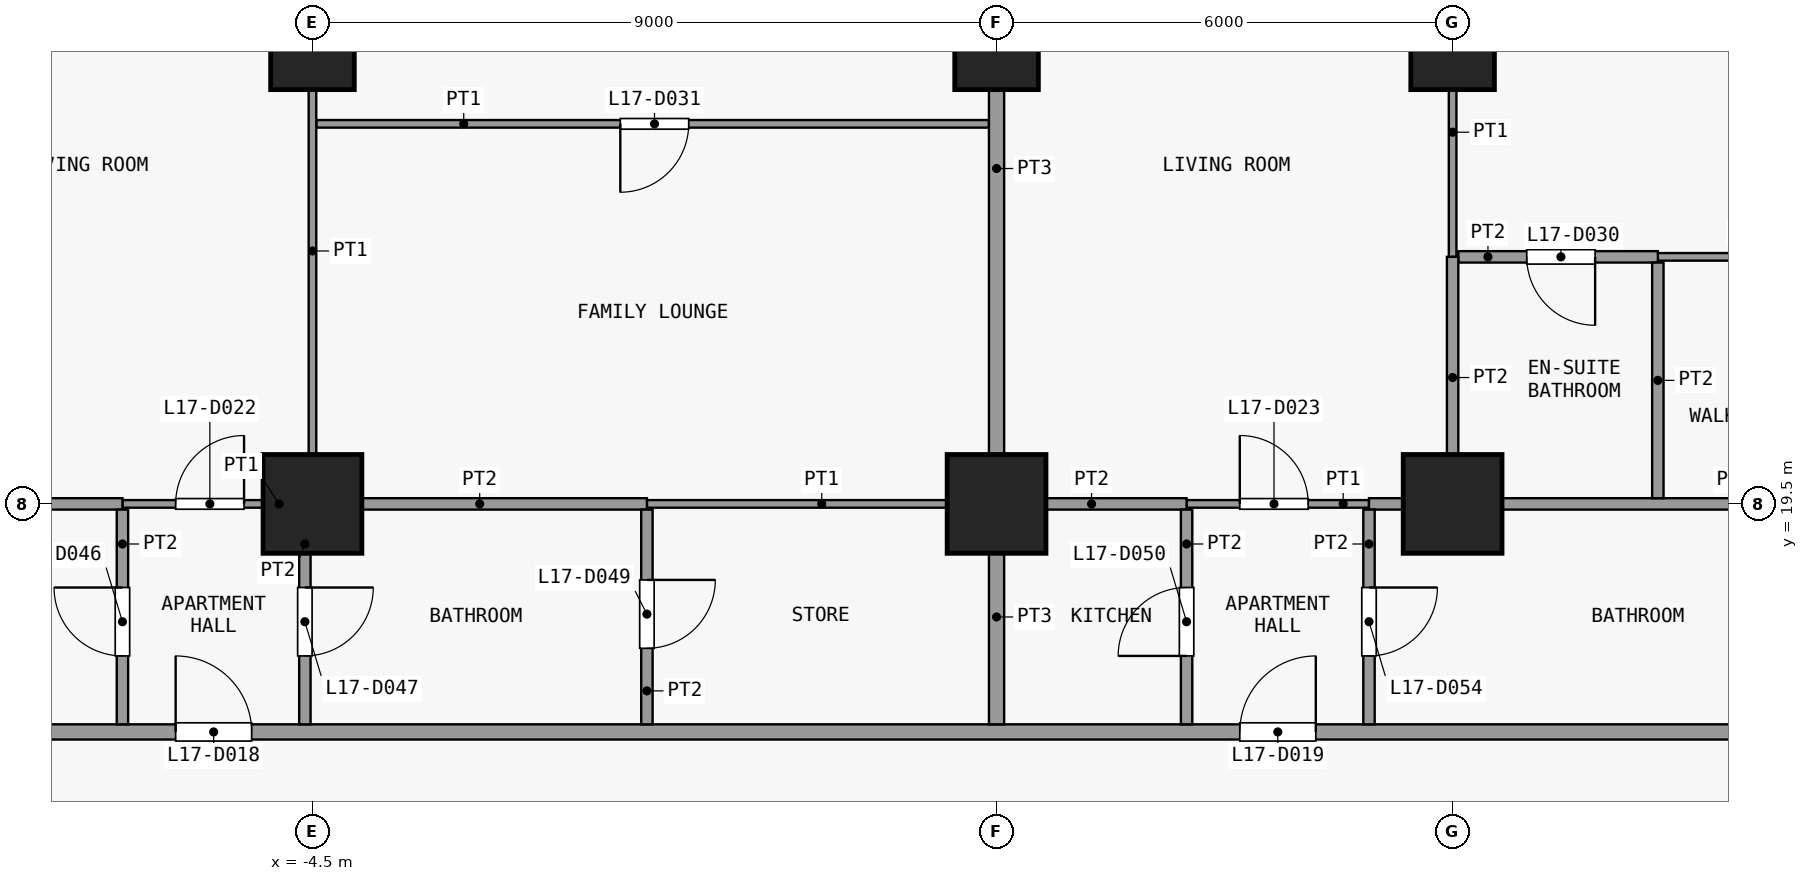
"""IFC4 building model, lengths in metres.
Left out: names, types, materials, properties, quantities, classifications, styles, units other than length and angle.
Written with IfcOpenShell. Run it as: python <this file> out.ifc"""

import sys

from ifc_helpers import new_model, si_unit, direction, frame, frame_2d, origin, origin_2d, place, context, subcontext, project, spatial, rectangle, extrude, element, fill, save


model = new_model("IFC4")
c1 = context("Model", 3, precision=1e-05, world=origin(), true_north=direction((0.0, 1.0)))
c2 = subcontext(c1, "Body", "Model", "MODEL_VIEW")
j1 = project(units=[si_unit("LENGTHUNIT", "METRE"), si_unit("PLANEANGLEUNIT", "RADIAN")], contexts=[c1])
p1 = place(None, origin())
s1 = spatial("IfcSite", under=j1, at=p1, CompositionType="ELEMENT")
p2 = place(p1, origin())
s2 = spatial("IfcBuilding", under=s1, at=p2, CompositionType="ELEMENT")
p3 = place(p2, frame((0.0, 0.0, 72.1)))
s3 = spatial("IfcBuildingStorey", under=s2, at=p3, CompositionType="ELEMENT", Elevation=72.1)
p4 = place(p3, frame((-4.5, 19.5, 0.0), z_axis=(0.0, 0.0, 1.0), x_axis=(1.0, 0.0, 0.0)))
e1 = element("IfcColumn", 1, at=p4, inside=s3, PredefinedType="COLUMN", context=c2, shape_type="SweptSolid", body=[
    extrude(rectangle(XDim=1.3, YDim=1.3, at=origin_2d()), origin(), (0.0, 0.0, 1.0), 3.6),
])
p5 = place(p3, frame((-4.5, 25.5, 0.0), z_axis=(0.0, 0.0, 1.0), x_axis=(1.0, 0.0, 0.0)))
e2 = element("IfcColumn", 2, at=p5, inside=s3, PredefinedType="COLUMN", context=c2, shape_type="SweptSolid", body=[
    extrude(rectangle(XDim=1.1, YDim=1.1, at=origin_2d()), origin(), (0.0, 0.0, 1.0), 3.6),
])
p6 = place(p3, frame((4.5, 19.5, 0.0), z_axis=(0.0, 0.0, 1.0), x_axis=(1.0, 0.0, 0.0)))
e3 = element("IfcColumn", 3, at=p6, inside=s3, PredefinedType="COLUMN", context=c2, shape_type="SweptSolid", body=[
    extrude(rectangle(XDim=1.3, YDim=1.3, at=origin_2d()), origin(), (0.0, 0.0, 1.0), 3.6),
])
p7 = place(p3, frame((4.5, 25.5, 0.0), z_axis=(0.0, 0.0, 1.0), x_axis=(1.0, 0.0, 0.0)))
e4 = element("IfcColumn", 4, at=p7, inside=s3, PredefinedType="COLUMN", context=c2, shape_type="SweptSolid", body=[
    extrude(rectangle(XDim=1.1, YDim=1.1, at=origin_2d()), origin(), (0.0, 0.0, 1.0), 3.6),
])
p8 = place(p3, frame((10.5, 19.5, 0.0), z_axis=(0.0, 0.0, 1.0), x_axis=(1.0, 0.0, 0.0)))
e5 = element("IfcColumn", 5, at=p8, inside=s3, PredefinedType="COLUMN", context=c2, shape_type="SweptSolid", body=[
    extrude(rectangle(XDim=1.3, YDim=1.3, at=origin_2d()), origin(), (0.0, 0.0, 1.0), 3.6),
])
p9 = place(p3, frame((10.5, 25.5, 0.0), z_axis=(0.0, 0.0, 1.0), x_axis=(1.0, 0.0, 0.0)))
e6 = element("IfcColumn", 6, at=p9, inside=s3, PredefinedType="COLUMN", context=c2, shape_type="SweptSolid", body=[
    extrude(rectangle(XDim=1.1, YDim=1.1, at=origin_2d()), origin(), (0.0, 0.0, 1.0), 3.6),
])
p10 = place(p3, frame((-25.35, 16.5, 0.0), z_axis=(0.0, 0.0, 1.0), x_axis=(1.0, 0.0, 0.0)))
e7 = element("IfcWall", 7, at=p10, inside=s3, PredefinedType="PARTITIONING", context=c2, shape_type="SweptSolid", body=[
    extrude(rectangle(XDim=50.7, YDim=0.2, at=frame_2d((25.35, 0.0))), origin(), (0.0, 0.0, 1.0), 3.15),
])
p11 = place(p10, frame((4.55, 0.0, 0.0)))
e8 = element("IfcOpeningElement", 8, at=p11, cuts=e7, PredefinedType="OPENING", context=c2, shape_type="SweptSolid", body=[
    extrude(rectangle(XDim=1.0, YDim=2.1, at=frame_2d((0.5, 1.05))), frame((0.0, 0.11, 0.0), z_axis=(0.0, -1.0, 0.0), x_axis=(1.0, 0.0, 0.0)), (0.0, 0.0, 1.0), 0.22),
])
p12 = place(p10, frame((19.05, 0.0, 0.0)))
e9 = element("IfcOpeningElement", 9, at=p12, cuts=e7, PredefinedType="OPENING", context=c2, shape_type="SweptSolid", body=[
    extrude(rectangle(XDim=1.0, YDim=2.1, at=frame_2d((0.5, 1.05))), frame((0.0, 0.11, 0.0), z_axis=(0.0, -1.0, 0.0), x_axis=(1.0, 0.0, 0.0)), (0.0, 0.0, 1.0), 0.22),
])
p13 = place(p10, frame((33.05, 0.0, 0.0)))
e10 = element("IfcOpeningElement", 10, at=p13, cuts=e7, PredefinedType="OPENING", context=c2, shape_type="SweptSolid", body=[
    extrude(rectangle(XDim=1.0, YDim=2.1, at=frame_2d((0.5, 1.05))), frame((0.0, 0.11, 0.0), z_axis=(0.0, -1.0, 0.0), x_axis=(1.0, 0.0, 0.0)), (0.0, 0.0, 1.0), 0.22),
])
p14 = place(p10, frame((45.05, 0.0, 0.0)))
e11 = element("IfcOpeningElement", 11, at=p14, cuts=e7, PredefinedType="OPENING", context=c2, shape_type="SweptSolid", body=[
    extrude(rectangle(XDim=1.0, YDim=2.1, at=frame_2d((0.5, 1.05))), frame((0.0, 0.11, 0.0), z_axis=(0.0, -1.0, 0.0), x_axis=(1.0, 0.0, 0.0)), (0.0, 0.0, 1.0), 0.22),
])
p15 = place(p3, frame((-7.0, 19.5, 0.0), z_axis=(0.0, 0.0, 1.0), x_axis=(1.0, 0.0, 0.0)))
e12 = element("IfcWall", 12, at=p15, inside=s3, PredefinedType="PARTITIONING", context=c2, shape_type="SweptSolid", body=[
    extrude(rectangle(XDim=2.4, YDim=0.1, at=frame_2d((1.2, 0.0))), origin(), (0.0, 0.0, 1.0), 3.15),
])
p16 = place(p15, frame((0.7, 0.0, 0.0)))
e13 = element("IfcOpeningElement", 13, at=p16, cuts=e12, PredefinedType="OPENING", context=c2, shape_type="SweptSolid", body=[
    extrude(rectangle(XDim=0.9, YDim=2.1, at=frame_2d((0.45, 1.05))), frame((0.0, 0.06, 0.0), z_axis=(0.0, -1.0, 0.0), x_axis=(1.0, 0.0, 0.0)), (0.0, 0.0, 1.0), 0.12),
])
p17 = place(p3, frame((-0.1, 19.5, 0.0), z_axis=(0.0, 0.0, 1.0), x_axis=(1.0, 0.0, 0.0)))
e14 = element("IfcWall", 14, at=p17, inside=s3, PredefinedType="PARTITIONING", context=c2, shape_type="SweptSolid", body=[
    extrude(rectangle(XDim=4.6, YDim=0.1, at=frame_2d((2.3, 0.0))), origin(), (0.0, 0.0, 1.0), 3.15),
])
p18 = place(p3, frame((7.0, 19.5, 0.0), z_axis=(0.0, 0.0, 1.0), x_axis=(1.0, 0.0, 0.0)))
e15 = element("IfcWall", 15, at=p18, inside=s3, PredefinedType="PARTITIONING", context=c2, shape_type="SweptSolid", body=[
    extrude(rectangle(XDim=2.4, YDim=0.1, at=frame_2d((1.2, 0.0))), origin(), (0.0, 0.0, 1.0), 3.15),
])
p19 = place(p18, frame((0.7, 0.0, 0.0)))
e16 = element("IfcOpeningElement", 16, at=p19, cuts=e15, PredefinedType="OPENING", context=c2, shape_type="SweptSolid", body=[
    extrude(rectangle(XDim=0.9, YDim=2.1, at=frame_2d((0.45, 1.05))), frame((0.0, 0.06, 0.0), z_axis=(0.0, -1.0, 0.0), x_axis=(1.0, 0.0, 0.0)), (0.0, 0.0, 1.0), 0.12),
])
p20 = place(p3, frame((-13.0, 19.5, 0.0), z_axis=(0.0, 0.0, 1.0), x_axis=(1.0, 0.0, 0.0)))
e17 = element("IfcWall", 17, at=p20, inside=s3, PredefinedType="PARTITIONING", context=c2, shape_type="SweptSolid", body=[
    extrude(rectangle(XDim=6.0, YDim=0.15, at=frame_2d((3.0, 0.0))), origin(), (0.0, 0.0, 1.0), 3.15),
])
p21 = place(p3, frame((-4.5, 19.5, 0.0), z_axis=(0.0, 0.0, 1.0), x_axis=(1.0, 0.0, 0.0)))
e18 = element("IfcWall", 18, at=p21, inside=s3, PredefinedType="PARTITIONING", context=c2, shape_type="SweptSolid", body=[
    extrude(rectangle(XDim=4.4, YDim=0.15, at=frame_2d((2.2, 0.0))), origin(), (0.0, 0.0, 1.0), 3.15),
])
p22 = place(p3, frame((4.5, 19.5, 0.0), z_axis=(0.0, 0.0, 1.0), x_axis=(1.0, 0.0, 0.0)))
e19 = element("IfcWall", 19, at=p22, inside=s3, PredefinedType="PARTITIONING", context=c2, shape_type="SweptSolid", body=[
    extrude(rectangle(XDim=2.5, YDim=0.15, at=frame_2d((1.25, 0.0))), origin(), (0.0, 0.0, 1.0), 3.15),
])
p23 = place(p3, frame((9.4, 19.5, 0.0), z_axis=(0.0, 0.0, 1.0), x_axis=(1.0, 0.0, 0.0)))
e20 = element("IfcWall", 20, at=p23, inside=s3, PredefinedType="PARTITIONING", context=c2, shape_type="SweptSolid", body=[
    extrude(rectangle(XDim=9.6, YDim=0.15, at=frame_2d((4.8, 0.0))), origin(), (0.0, 0.0, 1.0), 3.15),
])
p24 = place(p3, frame((13.2, 22.75, 0.0), z_axis=(0.0, 0.0, 1.0), x_axis=(1.0, 0.0, 0.0)))
e21 = element("IfcWall", 21, at=p24, inside=s3, PredefinedType="PARTITIONING", context=c2, shape_type="SweptSolid", body=[
    extrude(rectangle(XDim=3.2, YDim=0.1, at=frame_2d((1.6, 0.0))), origin(), (0.0, 0.0, 1.0), 3.15),
])
p25 = place(p24, frame((1.1, 0.0, 0.0)))
e22 = element("IfcOpeningElement", 22, at=p25, cuts=e21, PredefinedType="OPENING", context=c2, shape_type="SweptSolid", body=[
    extrude(rectangle(XDim=0.9, YDim=2.1, at=frame_2d((0.45, 1.05))), frame((0.0, 0.06, 0.0), z_axis=(0.0, -1.0, 0.0), x_axis=(1.0, 0.0, 0.0)), (0.0, 0.0, 1.0), 0.12),
])
p26 = place(p3, frame((10.575, 22.75, 0.0), z_axis=(0.0, 0.0, 1.0), x_axis=(1.0, 0.0, 0.0)))
e23 = element("IfcWall", 23, at=p26, inside=s3, PredefinedType="PARTITIONING", context=c2, shape_type="SweptSolid", body=[
    extrude(rectangle(XDim=2.625, YDim=0.15, at=frame_2d((1.312, 0.0))), origin(), (0.0, 0.0, 1.0), 3.15),
])
p27 = place(p26, frame((0.9, 0.0, 0.0)))
e24 = element("IfcOpeningElement", 24, at=p27, cuts=e23, PredefinedType="OPENING", context=c2, shape_type="SweptSolid", body=[
    extrude(rectangle(XDim=0.9, YDim=2.1, at=frame_2d((0.45, 1.05))), frame((0.0, 0.085, 0.0), z_axis=(0.0, -1.0, 0.0), x_axis=(1.0, 0.0, 0.0)), (0.0, 0.0, 1.0), 0.17),
])
p28 = place(p3, frame((-4.45, 24.5, 0.0), z_axis=(0.0, 0.0, 1.0), x_axis=(1.0, 0.0, 0.0)))
e25 = element("IfcWall", 25, at=p28, inside=s3, PredefinedType="PARTITIONING", context=c2, shape_type="SweptSolid", body=[
    extrude(rectangle(XDim=8.85, YDim=0.1, at=frame_2d((4.425, 0.0))), origin(), (0.0, 0.0, 1.0), 3.15),
])
p29 = place(p28, frame((4.0, 0.0, 0.0)))
e26 = element("IfcOpeningElement", 26, at=p29, cuts=e25, PredefinedType="OPENING", context=c2, shape_type="SweptSolid", body=[
    extrude(rectangle(XDim=0.9, YDim=2.1, at=frame_2d((0.45, 1.05))), frame((0.0, 0.06, 0.0), z_axis=(0.0, -1.0, 0.0), x_axis=(1.0, 0.0, 0.0)), (0.0, 0.0, 1.0), 0.12),
])
p30 = place(p3, frame((-7.0, 16.6, 0.0), z_axis=(0.0, 0.0, 1.0), x_axis=(0.0, 1.0, 0.0)))
e27 = element("IfcWall", 27, at=p30, inside=s3, PredefinedType="PARTITIONING", context=c2, shape_type="SweptSolid", body=[
    extrude(rectangle(XDim=2.825, YDim=0.15, at=frame_2d((1.413, 0.0))), origin(), (0.0, 0.0, 1.0), 3.15),
])
p31 = place(p30, frame((0.9, 0.0, 0.0)))
e28 = element("IfcOpeningElement", 28, at=p31, cuts=e27, PredefinedType="OPENING", context=c2, shape_type="SweptSolid", body=[
    extrude(rectangle(XDim=0.9, YDim=2.1, at=frame_2d((0.45, 1.05))), frame((0.0, 0.085, 0.0), z_axis=(0.0, -1.0, 0.0), x_axis=(1.0, 0.0, 0.0)), (0.0, 0.0, 1.0), 0.17),
])
p32 = place(p3, frame((-4.6, 16.6, 0.0), z_axis=(0.0, 0.0, 1.0), x_axis=(0.0, 1.0, 0.0)))
e29 = element("IfcWall", 29, at=p32, inside=s3, PredefinedType="PARTITIONING", context=c2, shape_type="SweptSolid", body=[
    extrude(rectangle(XDim=2.825, YDim=0.15, at=frame_2d((1.413, 0.0))), origin(), (0.0, 0.0, 1.0), 3.15),
])
p33 = place(p32, frame((0.9, 0.0, 0.0)))
e30 = element("IfcOpeningElement", 30, at=p33, cuts=e29, PredefinedType="OPENING", context=c2, shape_type="SweptSolid", body=[
    extrude(rectangle(XDim=0.9, YDim=2.1, at=frame_2d((0.45, 1.05))), frame((0.0, 0.085, 0.0), z_axis=(0.0, -1.0, 0.0), x_axis=(1.0, 0.0, 0.0)), (0.0, 0.0, 1.0), 0.17),
])
p34 = place(p3, frame((-4.5, 19.575, 0.0), z_axis=(0.0, 0.0, 1.0), x_axis=(0.0, 1.0, 0.0)))
e31 = element("IfcWall", 31, at=p34, inside=s3, PredefinedType="PARTITIONING", context=c2, shape_type="SweptSolid", body=[
    extrude(rectangle(XDim=8.675, YDim=0.1, at=frame_2d((4.337, 0.0))), origin(), (0.0, 0.0, 1.0), 3.15),
])
p35 = place(p34, frame((6.625, 0.0, 0.0)))
e32 = element("IfcOpeningElement", 32, at=p35, cuts=e31, PredefinedType="OPENING", context=c2, shape_type="SweptSolid", body=[
    extrude(rectangle(XDim=0.9, YDim=2.1, at=frame_2d((0.45, 1.05))), frame((0.0, 0.06, 0.0), z_axis=(0.0, -1.0, 0.0), x_axis=(1.0, 0.0, 0.0)), (0.0, 0.0, 1.0), 0.12),
])
p36 = place(p3, frame((-0.1, 16.6, 0.0), z_axis=(0.0, 0.0, 1.0), x_axis=(0.0, 1.0, 0.0)))
e33 = element("IfcWall", 33, at=p36, inside=s3, PredefinedType="PARTITIONING", context=c2, shape_type="SweptSolid", body=[
    extrude(rectangle(XDim=2.825, YDim=0.15, at=frame_2d((1.413, 0.0))), origin(), (0.0, 0.0, 1.0), 3.15),
])
p37 = place(p36, frame((1.0, 0.0, 0.0)))
e34 = element("IfcOpeningElement", 34, at=p37, cuts=e33, PredefinedType="OPENING", context=c2, shape_type="SweptSolid", body=[
    extrude(rectangle(XDim=0.9, YDim=2.1, at=frame_2d((0.45, 1.05))), frame((0.0, 0.085, 0.0), z_axis=(0.0, -1.0, 0.0), x_axis=(1.0, 0.0, 0.0)), (0.0, 0.0, 1.0), 0.17),
])
p38 = place(p3, frame((4.5, 16.6, 0.0), z_axis=(0.0, 0.0, 1.0), x_axis=(0.0, 1.0, 0.0)))
e35 = element("IfcWall", 35, at=p38, inside=s3, PredefinedType="PARTITIONING", context=c2, shape_type="SweptSolid", body=[
    extrude(rectangle(XDim=2.825, YDim=0.2, at=frame_2d((1.413, 0.0))), origin(), (0.0, 0.0, 1.0), 3.15),
])
p39 = place(p3, frame((4.5, 19.575, 0.0), z_axis=(0.0, 0.0, 1.0), x_axis=(0.0, 1.0, 0.0)))
e36 = element("IfcWall", 36, at=p39, inside=s3, PredefinedType="PARTITIONING", context=c2, shape_type="SweptSolid", body=[
    extrude(rectangle(XDim=8.675, YDim=0.2, at=frame_2d((4.337, 0.0))), origin(), (0.0, 0.0, 1.0), 3.15),
])
p40 = place(p3, frame((7.0, 16.6, 0.0), z_axis=(0.0, 0.0, 1.0), x_axis=(0.0, 1.0, 0.0)))
e37 = element("IfcWall", 37, at=p40, inside=s3, PredefinedType="PARTITIONING", context=c2, shape_type="SweptSolid", body=[
    extrude(rectangle(XDim=2.825, YDim=0.15, at=frame_2d((1.413, 0.0))), origin(), (0.0, 0.0, 1.0), 3.15),
])
p41 = place(p40, frame((0.9, 0.0, 0.0)))
e38 = element("IfcOpeningElement", 38, at=p41, cuts=e37, PredefinedType="OPENING", context=c2, shape_type="SweptSolid", body=[
    extrude(rectangle(XDim=0.9, YDim=2.1, at=frame_2d((0.45, 1.05))), frame((0.0, 0.085, 0.0), z_axis=(0.0, -1.0, 0.0), x_axis=(1.0, 0.0, 0.0)), (0.0, 0.0, 1.0), 0.17),
])
p42 = place(p3, frame((9.4, 16.6, 0.0), z_axis=(0.0, 0.0, 1.0), x_axis=(0.0, 1.0, 0.0)))
e39 = element("IfcWall", 39, at=p42, inside=s3, PredefinedType="PARTITIONING", context=c2, shape_type="SweptSolid", body=[
    extrude(rectangle(XDim=2.825, YDim=0.15, at=frame_2d((1.413, 0.0))), origin(), (0.0, 0.0, 1.0), 3.15),
])
p43 = place(p42, frame((0.9, 0.0, 0.0)))
e40 = element("IfcOpeningElement", 40, at=p43, cuts=e39, PredefinedType="OPENING", context=c2, shape_type="SweptSolid", body=[
    extrude(rectangle(XDim=0.9, YDim=2.1, at=frame_2d((0.45, 1.05))), frame((0.0, 0.085, 0.0), z_axis=(0.0, -1.0, 0.0), x_axis=(1.0, 0.0, 0.0)), (0.0, 0.0, 1.0), 0.17),
])
p44 = place(p3, frame((10.5, 22.75, 0.0), z_axis=(0.0, 0.0, 1.0), x_axis=(0.0, 1.0, 0.0)))
e41 = element("IfcWall", 41, at=p44, inside=s3, PredefinedType="PARTITIONING", context=c2, shape_type="SweptSolid", body=[
    extrude(rectangle(XDim=5.5, YDim=0.1, at=frame_2d((2.75, 0.0))), origin(), (0.0, 0.0, 1.0), 3.15),
])
p45 = place(p44, frame((3.4, 0.0, 0.0)))
e42 = element("IfcOpeningElement", 42, at=p45, cuts=e41, PredefinedType="OPENING", context=c2, shape_type="SweptSolid", body=[
    extrude(rectangle(XDim=0.9, YDim=2.1, at=frame_2d((0.45, 1.05))), frame((0.0, 0.06, 0.0), z_axis=(0.0, -1.0, 0.0), x_axis=(1.0, 0.0, 0.0)), (0.0, 0.0, 1.0), 0.12),
])
p46 = place(p3, frame((10.5, 19.575, 0.0), z_axis=(0.0, 0.0, 1.0), x_axis=(0.0, 1.0, 0.0)))
e43 = element("IfcWall", 43, at=p46, inside=s3, PredefinedType="PARTITIONING", context=c2, shape_type="SweptSolid", body=[
    extrude(rectangle(XDim=3.175, YDim=0.15, at=frame_2d((1.587, 0.0))), origin(), (0.0, 0.0, 1.0), 3.15),
])
p47 = place(p3, frame((13.2, 19.575, 0.0), z_axis=(0.0, 0.0, 1.0), x_axis=(0.0, 1.0, 0.0)))
e44 = element("IfcWall", 44, at=p47, inside=s3, PredefinedType="PARTITIONING", context=c2, shape_type="SweptSolid", body=[
    extrude(rectangle(XDim=3.1, YDim=0.15, at=frame_2d((1.55, 0.0))), origin(), (0.0, 0.0, 1.0), 3.15),
])
p48 = place(p12, origin())
e45 = element("IfcDoor", 45, at=p48, inside=s3, OperationType="SINGLE_SWING_RIGHT", PredefinedType="DOOR", context=c2, shape_type="SweptSolid", body=[
    extrude(rectangle(XDim=1.0, YDim=2.1, at=frame_2d((0.5, 1.05))), frame((0.0, 0.025, 0.0), z_axis=(0.0, -1.0, 0.0), x_axis=(1.0, 0.0, 0.0)), (0.0, 0.0, 1.0), 0.05),
])
fill(e9, e45)
p49 = place(p13, origin())
e46 = element("IfcDoor", 46, at=p49, inside=s3, OperationType="SINGLE_SWING_LEFT", PredefinedType="DOOR", context=c2, shape_type="SweptSolid", body=[
    extrude(rectangle(XDim=1.0, YDim=2.1, at=frame_2d((0.5, 1.05))), frame((0.0, 0.025, 0.0), z_axis=(0.0, -1.0, 0.0), x_axis=(1.0, 0.0, 0.0)), (0.0, 0.0, 1.0), 0.05),
])
fill(e10, e46)
p50 = place(p16, origin())
e47 = element("IfcDoor", 47, at=p50, inside=s3, OperationType="SINGLE_SWING_LEFT", PredefinedType="DOOR", context=c2, shape_type="SweptSolid", body=[
    extrude(rectangle(XDim=0.9, YDim=2.1, at=frame_2d((0.45, 1.05))), frame((0.0, 0.025, 0.0), z_axis=(0.0, -1.0, 0.0), x_axis=(1.0, 0.0, 0.0)), (0.0, 0.0, 1.0), 0.05),
])
fill(e13, e47)
p51 = place(p19, origin())
e48 = element("IfcDoor", 48, at=p51, inside=s3, OperationType="SINGLE_SWING_RIGHT", PredefinedType="DOOR", context=c2, shape_type="SweptSolid", body=[
    extrude(rectangle(XDim=0.9, YDim=2.1, at=frame_2d((0.45, 1.05))), frame((0.0, 0.025, 0.0), z_axis=(0.0, -1.0, 0.0), x_axis=(1.0, 0.0, 0.0)), (0.0, 0.0, 1.0), 0.05),
])
fill(e16, e48)
p52 = place(p27, origin())
e49 = element("IfcDoor", 49, at=p52, inside=s3, OperationType="SINGLE_SWING_RIGHT", PredefinedType="DOOR", context=c2, shape_type="SweptSolid", body=[
    extrude(rectangle(XDim=0.9, YDim=2.1, at=frame_2d((0.45, 1.05))), frame((0.0, 0.025, 0.0), z_axis=(0.0, -1.0, 0.0), x_axis=(1.0, 0.0, 0.0)), (0.0, 0.0, 1.0), 0.05),
])
fill(e24, e49)
p53 = place(p29, origin())
e50 = element("IfcDoor", 50, at=p53, inside=s3, OperationType="SINGLE_SWING_LEFT", PredefinedType="DOOR", context=c2, shape_type="SweptSolid", body=[
    extrude(rectangle(XDim=0.9, YDim=2.1, at=frame_2d((0.45, 1.05))), frame((0.0, 0.025, 0.0), z_axis=(0.0, -1.0, 0.0), x_axis=(1.0, 0.0, 0.0)), (0.0, 0.0, 1.0), 0.05),
])
fill(e26, e50)
p54 = place(p31, origin())
e51 = element("IfcDoor", 51, at=p54, inside=s3, OperationType="SINGLE_SWING_LEFT", PredefinedType="DOOR", context=c2, shape_type="SweptSolid", body=[
    extrude(rectangle(XDim=0.9, YDim=2.1, at=frame_2d((0.45, 1.05))), frame((0.0, 0.025, 0.0), z_axis=(0.0, -1.0, 0.0), x_axis=(1.0, 0.0, 0.0)), (0.0, 0.0, 1.0), 0.05),
])
fill(e28, e51)
p55 = place(p33, origin())
e52 = element("IfcDoor", 52, at=p55, inside=s3, OperationType="SINGLE_SWING_RIGHT", PredefinedType="DOOR", context=c2, shape_type="SweptSolid", body=[
    extrude(rectangle(XDim=0.9, YDim=2.1, at=frame_2d((0.45, 1.05))), frame((0.0, 0.025, 0.0), z_axis=(0.0, -1.0, 0.0), x_axis=(1.0, 0.0, 0.0)), (0.0, 0.0, 1.0), 0.05),
])
fill(e30, e52)
p56 = place(p37, origin())
e53 = element("IfcDoor", 53, at=p56, inside=s3, OperationType="SINGLE_SWING_RIGHT", PredefinedType="DOOR", context=c2, shape_type="SweptSolid", body=[
    extrude(rectangle(XDim=0.9, YDim=2.1, at=frame_2d((0.45, 1.05))), frame((0.0, 0.025, 0.0), z_axis=(0.0, -1.0, 0.0), x_axis=(1.0, 0.0, 0.0)), (0.0, 0.0, 1.0), 0.05),
])
fill(e34, e53)
p57 = place(p41, origin())
e54 = element("IfcDoor", 54, at=p57, inside=s3, OperationType="SINGLE_SWING_RIGHT", PredefinedType="DOOR", context=c2, shape_type="SweptSolid", body=[
    extrude(rectangle(XDim=0.9, YDim=2.1, at=frame_2d((0.45, 1.05))), frame((0.0, 0.025, 0.0), z_axis=(0.0, -1.0, 0.0), x_axis=(1.0, 0.0, 0.0)), (0.0, 0.0, 1.0), 0.05),
])
fill(e38, e54)
p58 = place(p43, origin())
e55 = element("IfcDoor", 55, at=p58, inside=s3, OperationType="SINGLE_SWING_RIGHT", PredefinedType="DOOR", context=c2, shape_type="SweptSolid", body=[
    extrude(rectangle(XDim=0.9, YDim=2.1, at=frame_2d((0.45, 1.05))), frame((0.0, 0.025, 0.0), z_axis=(0.0, -1.0, 0.0), x_axis=(1.0, 0.0, 0.0)), (0.0, 0.0, 1.0), 0.05),
])
fill(e40, e55)
save(model, sys.argv[1])
